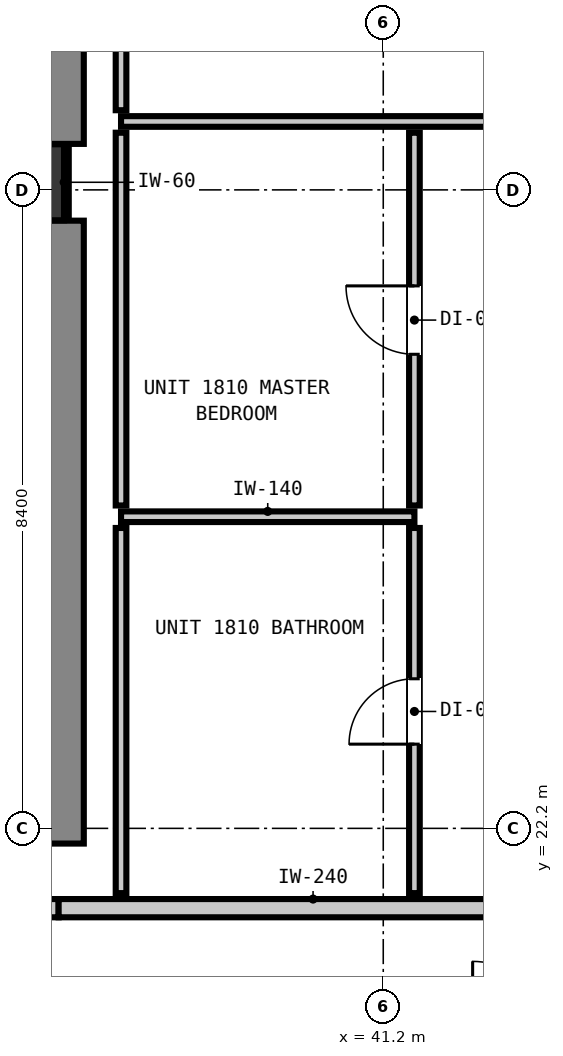
"""IFC4 building model, lengths in metres.
Left out: names, types, materials, properties, quantities, classifications, styles, units other than length and angle.
Written with IfcOpenShell. Run it as: python <this file> out.ifc"""

import sys

from ifc_helpers import new_model, si_unit, direction, frame, frame_2d, origin, origin_2d, place, context, subcontext, project, spatial, rectangle, extrude, element, fill, save


model = new_model("IFC4")
c1 = context("Model", 3, precision=1e-05, world=origin(), true_north=direction((0.0, 1.0)))
c2 = subcontext(c1, "Body", "Model", "MODEL_VIEW")
j1 = project(units=[si_unit("LENGTHUNIT", "METRE"), si_unit("PLANEANGLEUNIT", "RADIAN")], contexts=[c1])
p1 = place(None, origin())
s1 = spatial("IfcSite", under=j1, at=p1, CompositionType="ELEMENT")
p2 = place(p1, origin())
s2 = spatial("IfcBuilding", under=s1, at=p2, CompositionType="ELEMENT")
p3 = place(p2, frame((0.0, 0.0, 65.16)))
s3 = spatial("IfcBuildingStorey", under=s2, at=p3, CompositionType="ELEMENT", Elevation=65.16)
p4 = place(p3, frame((36.5, 30.7, 0.0), z_axis=(0.0, 0.0, 1.0), x_axis=(1.0, 0.0, 0.0)))
e1 = element("IfcColumn", 1, at=p4, inside=s3, PredefinedType="COLUMN", context=c2, shape_type="SweptSolid", body=[
    extrude(rectangle(XDim=1.0, YDim=1.0, at=origin_2d()), origin(), (0.0, 0.0, 1.0), 3.32),
])
p5 = place(p3, frame((36.66, 22.0, 0.0), z_axis=(0.0, 0.0, 1.0), x_axis=(0.0, 1.0, 0.0)))
e2 = element("IfcWall", 2, at=p5, inside=s3, PredefinedType="SHEAR", context=c2, shape_type="SweptSolid", body=[
    extrude(rectangle(XDim=8.195, YDim=1.2, at=frame_2d((4.098, 0.0))), origin(), (0.0, 0.0, 1.0), 3.32),
])
p6 = place(p3, frame((36.66, 31.205, 0.0), z_axis=(0.0, 0.0, 1.0), x_axis=(0.0, 1.0, 0.0)))
e3 = element("IfcWall", 3, at=p6, inside=s3, PredefinedType="SHEAR", context=c2, shape_type="SweptSolid", body=[
    extrude(rectangle(XDim=8.195, YDim=1.2, at=frame_2d((4.097, 0.0))), origin(), (0.0, 0.0, 1.0), 3.32),
])
p7 = place(p3, frame((10.15, 21.15, 0.0), z_axis=(0.0, 0.0, 1.0), x_axis=(1.0, 0.0, 0.0)))
e4 = element("IfcWall", 4, at=p7, inside=s3, PredefinedType="PARTITIONING", context=c2, shape_type="SweptSolid", body=[
    extrude(rectangle(XDim=26.779, YDim=0.24, at=frame_2d((13.39, 0.0))), origin(), (0.0, 0.0, 1.0), 3.06),
])
p8 = place(p7, frame((8.06, 0.0, 0.0)))
e5 = element("IfcOpeningElement", 5, at=p8, cuts=e4, PredefinedType="OPENING", context=c2, shape_type="SweptSolid", body=[
    extrude(rectangle(XDim=1.1, YDim=2.15, at=frame_2d((0.55, 1.075))), frame((0.0, 0.13, 0.0), z_axis=(0.0, -1.0, 0.0), x_axis=(1.0, 0.0, 0.0)), (0.0, 0.0, 1.0), 0.26),
])
p9 = place(p7, frame((0.324, 0.0, 0.0)))
e6 = element("IfcOpeningElement", 6, at=p9, cuts=e4, PredefinedType="OPENING", context=c2, shape_type="SweptSolid", body=[
    extrude(rectangle(XDim=1.4, YDim=2.15, at=frame_2d((0.7, 1.075))), frame((0.0, 0.13, 0.0), z_axis=(0.0, -1.0, 0.0), x_axis=(1.0, 0.0, 0.0)), (0.0, 0.0, 1.0), 0.26),
])
p10 = place(p3, frame((36.929, 21.15, 0.0), z_axis=(0.0, 0.0, 1.0), x_axis=(1.0, 0.0, 0.0)))
e7 = element("IfcWall", 7, at=p10, inside=s3, PredefinedType="PARTITIONING", context=c2, shape_type="SweptSolid", body=[
    extrude(rectangle(XDim=12.392, YDim=0.24, at=frame_2d((6.196, 0.0))), origin(), (0.0, 0.0, 1.0), 2.445),
])
p11 = place(p10, frame((6.795, 0.0, 0.0)))
e8 = element("IfcOpeningElement", 8, at=p11, cuts=e7, PredefinedType="OPENING", context=c2, shape_type="SweptSolid", body=[
    extrude(rectangle(XDim=1.0, YDim=2.15, at=frame_2d((0.5, 1.075))), frame((0.0, 0.13, 0.0), z_axis=(0.0, -1.0, 0.0), x_axis=(1.0, 0.0, 0.0)), (0.0, 0.0, 1.0), 0.26),
])
p12 = place(p3, frame((37.75, 26.3, 0.0), z_axis=(0.0, 0.0, 1.0), x_axis=(1.0, 0.0, 0.0)))
e9 = element("IfcWall", 9, at=p12, inside=s3, PredefinedType="PARTITIONING", context=c2, shape_type="SweptSolid", body=[
    extrude(rectangle(XDim=3.86, YDim=0.14, at=frame_2d((1.93, 0.0))), origin(), (0.0, 0.0, 1.0), 3.06),
])
p13 = place(p3, frame((37.75, 31.5, 0.0), z_axis=(0.0, 0.0, 1.0), x_axis=(1.0, 0.0, 0.0)))
e10 = element("IfcWall", 10, at=p13, inside=s3, PredefinedType="PARTITIONING", context=c2, shape_type="SweptSolid", body=[
    extrude(rectangle(XDim=12.423, YDim=0.14, at=frame_2d((6.211, 0.0))), origin(), (0.0, 0.0, 1.0), 3.06),
])
p14 = place(p3, frame((37.75, 21.348, 0.0), z_axis=(0.0, 0.0, 1.0), x_axis=(0.0, 1.0, 0.0)))
e11 = element("IfcWall", 11, at=p14, inside=s3, PredefinedType="PARTITIONING", context=c2, shape_type="SweptSolid", body=[
    extrude(rectangle(XDim=4.804, YDim=0.14, at=frame_2d((2.402, 0.0))), origin(), (0.0, 0.0, 1.0), 3.06),
])
p15 = place(p3, frame((37.75, 26.448, 0.0), z_axis=(0.0, 0.0, 1.0), x_axis=(0.0, 1.0, 0.0)))
e12 = element("IfcWall", 12, at=p15, inside=s3, PredefinedType="PARTITIONING", context=c2, shape_type="SweptSolid", body=[
    extrude(rectangle(XDim=4.904, YDim=0.14, at=frame_2d((2.452, 0.0))), origin(), (0.0, 0.0, 1.0), 3.06),
])
p16 = place(p3, frame((37.75, 31.648, 0.0), z_axis=(0.0, 0.0, 1.0), x_axis=(0.0, 1.0, 0.0)))
e13 = element("IfcWall", 13, at=p16, inside=s3, PredefinedType="PARTITIONING", context=c2, shape_type="SweptSolid", body=[
    extrude(rectangle(XDim=8.434, YDim=0.14, at=frame_2d((4.217, 0.0))), origin(), (0.0, 0.0, 1.0), 3.06),
])
p17 = place(p3, frame((41.61, 21.348, 0.0), z_axis=(0.0, 0.0, 1.0), x_axis=(0.0, 1.0, 0.0)))
e14 = element("IfcWall", 14, at=p17, inside=s3, PredefinedType="PARTITIONING", context=c2, shape_type="SweptSolid", body=[
    extrude(rectangle(XDim=4.804, YDim=0.14, at=frame_2d((2.402, 0.0))), origin(), (0.0, 0.0, 1.0), 3.06),
])
p18 = place(p17, frame((1.96, 0.0, 0.0)))
e15 = element("IfcOpeningElement", 15, at=p18, cuts=e14, PredefinedType="OPENING", context=c2, shape_type="SweptSolid", body=[
    extrude(rectangle(XDim=0.86, YDim=2.02, at=frame_2d((0.43, 1.01))), frame((0.0, 0.08, 0.0), z_axis=(0.0, -1.0, 0.0), x_axis=(1.0, 0.0, 0.0)), (0.0, 0.0, 1.0), 0.16),
])
p19 = place(p3, frame((41.61, 26.448, 0.0), z_axis=(0.0, 0.0, 1.0), x_axis=(0.0, 1.0, 0.0)))
e16 = element("IfcWall", 16, at=p19, inside=s3, PredefinedType="PARTITIONING", context=c2, shape_type="SweptSolid", body=[
    extrude(rectangle(XDim=4.904, YDim=0.14, at=frame_2d((2.452, 0.0))), origin(), (0.0, 0.0, 1.0), 3.06),
])
p20 = place(p19, frame((1.989, 0.0, 0.0)))
e17 = element("IfcOpeningElement", 17, at=p20, cuts=e16, PredefinedType="OPENING", context=c2, shape_type="SweptSolid", body=[
    extrude(rectangle(XDim=0.9, YDim=2.1, at=frame_2d((0.45, 1.05))), frame((0.0, 0.08, 0.0), z_axis=(0.0, -1.0, 0.0), x_axis=(1.0, 0.0, 0.0)), (0.0, 0.0, 1.0), 0.16),
])
p21 = place(p3, frame((37.032, 30.21, 0.0), z_axis=(0.0, 0.0, 1.0), x_axis=(0.0, 1.0, 0.0)))
e18 = element("IfcWall", 18, at=p21, inside=s3, PredefinedType="PARTITIONING", context=c2, shape_type="SweptSolid", body=[
    extrude(rectangle(XDim=0.98, YDim=0.06, at=frame_2d((0.49, 0.0))), origin(), (0.0, 0.0, 1.0), 1.45),
])
p22 = place(p18, origin())
e19 = element("IfcDoor", 19, at=p22, inside=s3, OperationType="SINGLE_SWING_LEFT", PredefinedType="DOOR", context=c2, shape_type="SweptSolid", body=[
    extrude(rectangle(XDim=0.86, YDim=2.02, at=frame_2d((0.43, 1.01))), frame((0.0, 0.025, 0.0), z_axis=(0.0, -1.0, 0.0), x_axis=(1.0, 0.0, 0.0)), (0.0, 0.0, 1.0), 0.05),
])
fill(e15, e19)
p23 = place(p20, origin())
e20 = element("IfcDoor", 20, at=p23, inside=s3, OperationType="SINGLE_SWING_RIGHT", PredefinedType="DOOR", context=c2, shape_type="SweptSolid", body=[
    extrude(rectangle(XDim=0.9, YDim=2.1, at=frame_2d((0.45, 1.05))), frame((0.0, 0.025, 0.0), z_axis=(0.0, -1.0, 0.0), x_axis=(1.0, 0.0, 0.0)), (0.0, 0.0, 1.0), 0.05),
])
fill(e17, e20)
save(model, sys.argv[1])
